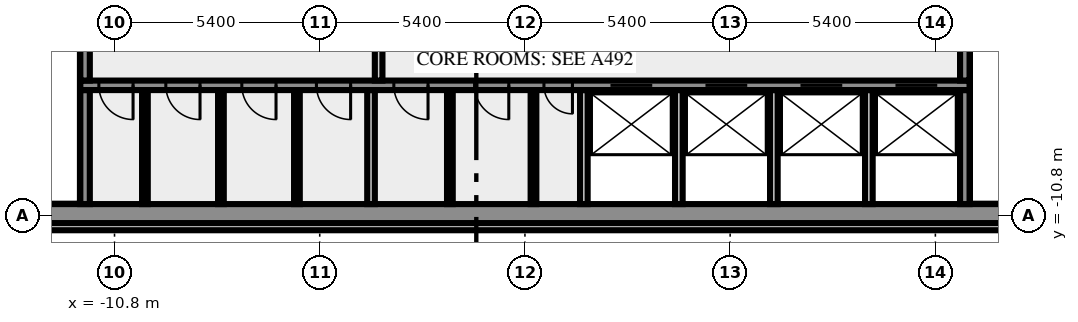
"""IFC4 building model, lengths in metres.
Left out: names, types, materials, properties, quantities, classifications, styles, units other than length and angle.
Written with IfcOpenShell. Run it as: python <this file> out.ifc"""

import sys

from ifc_helpers import new_model, si_unit, direction, frame, frame_2d, origin, place, context, subcontext, project, spatial, rectangle, extrude, element, fill, save


model = new_model("IFC4")
c1 = context("Model", 3, precision=1e-05, world=origin(), true_north=direction((0.0, 1.0)))
c2 = subcontext(c1, "Body", "Model", "MODEL_VIEW")
j1 = project(units=[si_unit("LENGTHUNIT", "METRE"), si_unit("PLANEANGLEUNIT", "RADIAN")], contexts=[c1])
p1 = place(None, origin())
s1 = spatial("IfcSite", under=j1, at=p1, CompositionType="ELEMENT")
p2 = place(p1, origin())
s2 = spatial("IfcBuilding", under=s1, at=p2, CompositionType="ELEMENT")
p3 = place(p2, frame((0.0, 0.0, 202.0)))
s3 = spatial("IfcBuildingStorey", under=s2, at=p3, CompositionType="ELEMENT", Elevation=202.0)
p4 = place(p3, frame((-17.444, -11.088, 0.0), z_axis=(0.0, 0.0, 1.0), x_axis=(1.0, 0.0, 0.0)))
e1 = element("IfcWall", 1, at=p4, inside=s3, PredefinedType="SOLIDWALL", context=c2, shape_type="SweptSolid", body=[
    extrude(rectangle(XDim=34.888, YDim=0.2, at=frame_2d((17.444, 0.0))), origin(), (0.0, 0.0, 1.0), 3.65),
])
p5 = place(p3, frame((-20.0, -10.75, 0.0), z_axis=(0.0, 0.0, 1.0), x_axis=(1.0, 0.0, 0.0)))
e2 = element("IfcWall", 2, at=p5, inside=s3, PredefinedType="SHEAR", context=c2, shape_type="SweptSolid", body=[
    extrude(rectangle(XDim=40.0, YDim=0.5, at=frame_2d((20.0, 0.0))), origin(), (0.0, 0.0, 1.0), 3.65),
])
p6 = place(p5, frame((0.8, 0.0, 1.0)))
e3 = element("IfcOpeningElement", 3, at=p6, cuts=e2, PredefinedType="OPENING", context=c2, shape_type="SweptSolid", body=[
    extrude(rectangle(XDim=1.2, YDim=1.2, at=frame_2d((0.6, 0.6))), frame((0.0, 0.26, 0.0), z_axis=(0.0, -1.0, 0.0), x_axis=(1.0, 0.0, 0.0)), (0.0, 0.0, 1.0), 0.52),
])
p7 = place(p5, frame((38.0, 0.0, 1.0)))
e4 = element("IfcOpeningElement", 4, at=p7, cuts=e2, PredefinedType="OPENING", context=c2, shape_type="SweptSolid", body=[
    extrude(rectangle(XDim=1.2, YDim=1.2, at=frame_2d((0.6, 0.6))), frame((0.0, 0.26, 0.0), z_axis=(0.0, -1.0, 0.0), x_axis=(1.0, 0.0, 0.0)), (0.0, 0.0, 1.0), 0.52),
])
p8 = place(p3, frame((-11.575, -10.5, 0.0), z_axis=(0.0, 0.0, 1.0), x_axis=(0.0, 1.0, 0.0)))
e5 = element("IfcWall", 5, at=p8, inside=s3, PredefinedType="SHEAR", context=c2, shape_type="SweptSolid", body=[
    extrude(rectangle(XDim=3.0, YDim=0.25, at=frame_2d((1.5, 0.0))), origin(), (0.0, 0.0, 1.0), 3.65),
])
for number, where, z_axis, x_axis in (
    (6, (-10.0, -10.5, 0.0), (0.0, 0.0, 1.0), (0.0, 1.0, 0.0)),
    (7, (-8.0, -10.5, 0.0), (0.0, 0.0, 1.0), (0.0, 1.0, 0.0)),
    (8, (-6.0, -10.5, 0.0), (0.0, 0.0, 1.0), (0.0, 1.0, 0.0)),
):
    element("IfcWall", number, at=place(p3, frame(where, z_axis=z_axis, x_axis=x_axis)), inside=s3, PredefinedType="PARTITIONING", context=c2, shape_type="SweptSolid", body=[
        extrude(rectangle(XDim=3.0, YDim=0.15, at=frame_2d((1.5, 0.0))), origin(), (0.0, 0.0, 1.0), 3.65),
    ])
p9 = place(p3, frame((-4.05, -10.5, 0.0), z_axis=(0.0, 0.0, 1.0), x_axis=(0.0, 1.0, 0.0)))
e9 = element("IfcWall", 9, at=p9, inside=s3, PredefinedType="SOLIDWALL", context=c2, shape_type="SweptSolid", body=[
    extrude(rectangle(XDim=3.0, YDim=0.2, at=frame_2d((1.5, 0.0))), origin(), (0.0, 0.0, 1.0), 3.65),
])
for number, where, z_axis, x_axis in (
    (10, (-1.975, -10.5, 0.0), (0.0, 0.0, 1.0), (0.0, 1.0, 0.0)),
    (11, (0.225, -10.5, 0.0), (0.0, 0.0, 1.0), (0.0, 1.0, 0.0)),
):
    element("IfcWall", number, at=place(p3, frame(where, z_axis=z_axis, x_axis=x_axis)), inside=s3, PredefinedType="PARTITIONING", context=c2, shape_type="SweptSolid", body=[
        extrude(rectangle(XDim=3.0, YDim=0.15, at=frame_2d((1.5, 0.0))), origin(), (0.0, 0.0, 1.0), 3.65),
    ])
for number, where, z_axis, x_axis in (
    (12, (1.55, -10.5, 0.0), (0.0, 0.0, 1.0), (0.0, 1.0, 0.0)),
    (13, (4.05, -10.5, 0.0), (0.0, 0.0, 1.0), (0.0, 1.0, 0.0)),
    (14, (6.55, -10.5, 0.0), (0.0, 0.0, 1.0), (0.0, 1.0, 0.0)),
    (15, (9.05, -10.5, 0.0), (0.0, 0.0, 1.0), (0.0, 1.0, 0.0)),
):
    element("IfcWall", number, at=place(p3, frame(where, z_axis=z_axis, x_axis=x_axis)), inside=s3, PredefinedType="SOLIDWALL", context=c2, shape_type="SweptSolid", body=[
        extrude(rectangle(XDim=3.0, YDim=0.2, at=frame_2d((1.5, 0.0))), origin(), (0.0, 0.0, 1.0), 3.65),
    ])
p10 = place(p3, frame((11.575, -10.5, 0.0), z_axis=(0.0, 0.0, 1.0), x_axis=(0.0, 1.0, 0.0)))
e16 = element("IfcWall", 16, at=p10, inside=s3, PredefinedType="SHEAR", context=c2, shape_type="SweptSolid", body=[
    extrude(rectangle(XDim=3.0, YDim=0.25, at=frame_2d((1.5, 0.0))), origin(), (0.0, 0.0, 1.0), 3.65),
])
p11 = place(p3, frame((11.7, -7.375, 0.0), z_axis=(0.0, 0.0, 1.0), x_axis=(-1.0, 0.0, 0.0)))
e17 = element("IfcWall", 17, at=p11, inside=s3, PredefinedType="SHEAR", context=c2, shape_type="SweptSolid", body=[
    extrude(rectangle(XDim=23.4, YDim=0.25, at=frame_2d((11.7, 0.0))), origin(), (0.0, 0.0, 1.0), 3.65),
])
p12 = place(p11, frame((22.012, 0.0, 0.0)))
e18 = element("IfcOpeningElement", 18, at=p12, cuts=e17, PredefinedType="OPENING", context=c2, shape_type="SweptSolid", body=[
    extrude(rectangle(XDim=0.9, YDim=2.1, at=frame_2d((0.45, 1.05))), frame((0.0, 0.135, 0.0), z_axis=(0.0, -1.0, 0.0), x_axis=(1.0, 0.0, 0.0)), (0.0, 0.0, 1.0), 0.27),
])
p13 = place(p11, frame((20.25, 0.0, 0.0)))
e19 = element("IfcOpeningElement", 19, at=p13, cuts=e17, PredefinedType="OPENING", context=c2, shape_type="SweptSolid", body=[
    extrude(rectangle(XDim=0.9, YDim=2.1, at=frame_2d((0.45, 1.05))), frame((0.0, 0.135, 0.0), z_axis=(0.0, -1.0, 0.0), x_axis=(1.0, 0.0, 0.0)), (0.0, 0.0, 1.0), 0.27),
])
p14 = place(p11, frame((18.25, 0.0, 0.0)))
e20 = element("IfcOpeningElement", 20, at=p14, cuts=e17, PredefinedType="OPENING", context=c2, shape_type="SweptSolid", body=[
    extrude(rectangle(XDim=0.9, YDim=2.1, at=frame_2d((0.45, 1.05))), frame((0.0, 0.135, 0.0), z_axis=(0.0, -1.0, 0.0), x_axis=(1.0, 0.0, 0.0)), (0.0, 0.0, 1.0), 0.27),
])
p15 = place(p11, frame((16.287, 0.0, 0.0)))
e21 = element("IfcOpeningElement", 21, at=p15, cuts=e17, PredefinedType="OPENING", context=c2, shape_type="SweptSolid", body=[
    extrude(rectangle(XDim=0.9, YDim=2.1, at=frame_2d((0.45, 1.05))), frame((0.0, 0.135, 0.0), z_axis=(0.0, -1.0, 0.0), x_axis=(1.0, 0.0, 0.0)), (0.0, 0.0, 1.0), 0.27),
])
p16 = place(p11, frame((14.25, 0.0, 0.0)))
e22 = element("IfcOpeningElement", 22, at=p16, cuts=e17, PredefinedType="OPENING", context=c2, shape_type="SweptSolid", body=[
    extrude(rectangle(XDim=0.9, YDim=2.1, at=frame_2d((0.45, 1.05))), frame((0.0, 0.135, 0.0), z_axis=(0.0, -1.0, 0.0), x_axis=(1.0, 0.0, 0.0)), (0.0, 0.0, 1.0), 0.27),
])
p17 = place(p11, frame((12.125, 0.0, 0.0)))
e23 = element("IfcOpeningElement", 23, at=p17, cuts=e17, PredefinedType="OPENING", context=c2, shape_type="SweptSolid", body=[
    extrude(rectangle(XDim=0.9, YDim=2.1, at=frame_2d((0.45, 1.05))), frame((0.0, 0.135, 0.0), z_axis=(0.0, -1.0, 0.0), x_axis=(1.0, 0.0, 0.0)), (0.0, 0.0, 1.0), 0.27),
])
p18 = place(p11, frame((10.45, 0.0, 0.0)))
e24 = element("IfcOpeningElement", 24, at=p18, cuts=e17, PredefinedType="OPENING", context=c2, shape_type="SweptSolid", body=[
    extrude(rectangle(XDim=0.75, YDim=2.1, at=frame_2d((0.375, 1.05))), frame((0.0, 0.135, 0.0), z_axis=(0.0, -1.0, 0.0), x_axis=(1.0, 0.0, 0.0)), (0.0, 0.0, 1.0), 0.27),
])
p19 = place(p11, frame((8.35, 0.0, 0.0)))
e25 = element("IfcOpeningElement", 25, at=p19, cuts=e17, PredefinedType="OPENING", context=c2, shape_type="SweptSolid", body=[
    extrude(rectangle(XDim=1.1, YDim=2.1, at=frame_2d((0.55, 1.05))), frame((0.0, 0.135, 0.0), z_axis=(0.0, -1.0, 0.0), x_axis=(1.0, 0.0, 0.0)), (0.0, 0.0, 1.0), 0.27),
])
p20 = place(p11, frame((5.85, 0.0, 0.0)))
e26 = element("IfcOpeningElement", 26, at=p20, cuts=e17, PredefinedType="OPENING", context=c2, shape_type="SweptSolid", body=[
    extrude(rectangle(XDim=1.1, YDim=2.1, at=frame_2d((0.55, 1.05))), frame((0.0, 0.135, 0.0), z_axis=(0.0, -1.0, 0.0), x_axis=(1.0, 0.0, 0.0)), (0.0, 0.0, 1.0), 0.27),
])
p21 = place(p11, frame((3.35, 0.0, 0.0)))
e27 = element("IfcOpeningElement", 27, at=p21, cuts=e17, PredefinedType="OPENING", context=c2, shape_type="SweptSolid", body=[
    extrude(rectangle(XDim=1.1, YDim=2.1, at=frame_2d((0.55, 1.05))), frame((0.0, 0.135, 0.0), z_axis=(0.0, -1.0, 0.0), x_axis=(1.0, 0.0, 0.0)), (0.0, 0.0, 1.0), 0.27),
])
p22 = place(p11, frame((0.85, 0.0, 0.0)))
e28 = element("IfcOpeningElement", 28, at=p22, cuts=e17, PredefinedType="OPENING", context=c2, shape_type="SweptSolid", body=[
    extrude(rectangle(XDim=1.1, YDim=2.1, at=frame_2d((0.55, 1.05))), frame((0.0, 0.135, 0.0), z_axis=(0.0, -1.0, 0.0), x_axis=(1.0, 0.0, 0.0)), (0.0, 0.0, 1.0), 0.27),
])
p23 = place(p3, frame((-11.575, -7.25, 0.0), z_axis=(0.0, 0.0, 1.0), x_axis=(0.0, 1.0, 0.0)))
e29 = element("IfcWall", 29, at=p23, inside=s3, PredefinedType="SHEAR", context=c2, shape_type="SweptSolid", body=[
    extrude(rectangle(XDim=1.0, YDim=0.25, at=frame_2d((0.5, 0.0))), origin(), (0.0, 0.0, 1.0), 3.65),
])
p24 = place(p3, frame((-3.85, -4.25, 0.0), z_axis=(0.0, 0.0, 1.0), x_axis=(0.0, -1.0, 0.0)))
e30 = element("IfcWall", 30, at=p24, inside=s3, PredefinedType="SOLIDWALL", context=c2, shape_type="SweptSolid", body=[
    extrude(rectangle(XDim=3.0, YDim=0.2, at=frame_2d((1.5, 0.0))), origin(), (0.0, 0.0, 1.0), 3.65),
])
p25 = place(p24, frame((0.8, 0.0, 0.0)))
e31 = element("IfcOpeningElement", 31, at=p25, cuts=e30, PredefinedType="OPENING", context=c2, shape_type="SweptSolid", body=[
    extrude(rectangle(XDim=1.4, YDim=2.1, at=frame_2d((0.7, 1.05))), frame((0.0, 0.11, 0.0), z_axis=(0.0, -1.0, 0.0), x_axis=(1.0, 0.0, 0.0)), (0.0, 0.0, 1.0), 0.22),
])
p26 = place(p3, frame((11.575, -7.25, 0.0), z_axis=(0.0, 0.0, 1.0), x_axis=(0.0, 1.0, 0.0)))
e32 = element("IfcWall", 32, at=p26, inside=s3, PredefinedType="SHEAR", context=c2, shape_type="SweptSolid", body=[
    extrude(rectangle(XDim=1.0, YDim=0.25, at=frame_2d((0.5, 0.0))), origin(), (0.0, 0.0, 1.0), 3.65),
])
p27 = place(p12, origin())
e33 = element("IfcDoor", 33, at=p27, inside=s3, OperationType="SINGLE_SWING_RIGHT", PredefinedType="DOOR", context=c2, shape_type="SweptSolid", body=[
    extrude(rectangle(XDim=0.9, YDim=2.1, at=frame_2d((0.45, 1.05))), frame((0.0, 0.025, 0.0), z_axis=(0.0, -1.0, 0.0), x_axis=(1.0, 0.0, 0.0)), (0.0, 0.0, 1.0), 0.05),
])
fill(e18, e33)
p28 = place(p13, origin())
e34 = element("IfcDoor", 34, at=p28, inside=s3, OperationType="SINGLE_SWING_RIGHT", PredefinedType="DOOR", context=c2, shape_type="SweptSolid", body=[
    extrude(rectangle(XDim=0.9, YDim=2.1, at=frame_2d((0.45, 1.05))), frame((0.0, 0.025, 0.0), z_axis=(0.0, -1.0, 0.0), x_axis=(1.0, 0.0, 0.0)), (0.0, 0.0, 1.0), 0.05),
])
fill(e19, e34)
p29 = place(p14, origin())
e35 = element("IfcDoor", 35, at=p29, inside=s3, OperationType="SINGLE_SWING_RIGHT", PredefinedType="DOOR", context=c2, shape_type="SweptSolid", body=[
    extrude(rectangle(XDim=0.9, YDim=2.1, at=frame_2d((0.45, 1.05))), frame((0.0, 0.025, 0.0), z_axis=(0.0, -1.0, 0.0), x_axis=(1.0, 0.0, 0.0)), (0.0, 0.0, 1.0), 0.05),
])
fill(e20, e35)
p30 = place(p15, origin())
e36 = element("IfcDoor", 36, at=p30, inside=s3, OperationType="SINGLE_SWING_RIGHT", PredefinedType="DOOR", context=c2, shape_type="SweptSolid", body=[
    extrude(rectangle(XDim=0.9, YDim=2.1, at=frame_2d((0.45, 1.05))), frame((0.0, 0.025, 0.0), z_axis=(0.0, -1.0, 0.0), x_axis=(1.0, 0.0, 0.0)), (0.0, 0.0, 1.0), 0.05),
])
fill(e21, e36)
p31 = place(p16, origin())
e37 = element("IfcDoor", 37, at=p31, inside=s3, OperationType="SINGLE_SWING_RIGHT", PredefinedType="DOOR", context=c2, shape_type="SweptSolid", body=[
    extrude(rectangle(XDim=0.9, YDim=2.1, at=frame_2d((0.45, 1.05))), frame((0.0, 0.025, 0.0), z_axis=(0.0, -1.0, 0.0), x_axis=(1.0, 0.0, 0.0)), (0.0, 0.0, 1.0), 0.05),
])
fill(e22, e37)
p32 = place(p17, origin())
e38 = element("IfcDoor", 38, at=p32, inside=s3, OperationType="SINGLE_SWING_RIGHT", PredefinedType="DOOR", context=c2, shape_type="SweptSolid", body=[
    extrude(rectangle(XDim=0.9, YDim=2.1, at=frame_2d((0.45, 1.05))), frame((0.0, 0.025, 0.0), z_axis=(0.0, -1.0, 0.0), x_axis=(1.0, 0.0, 0.0)), (0.0, 0.0, 1.0), 0.05),
])
fill(e23, e38)
p33 = place(p18, origin())
e39 = element("IfcDoor", 39, at=p33, inside=s3, OperationType="SINGLE_SWING_LEFT", PredefinedType="DOOR", context=c2, shape_type="SweptSolid", body=[
    extrude(rectangle(XDim=0.75, YDim=2.1, at=frame_2d((0.375, 1.05))), frame((0.0, 0.025, 0.0), z_axis=(0.0, -1.0, 0.0), x_axis=(1.0, 0.0, 0.0)), (0.0, 0.0, 1.0), 0.05),
])
fill(e24, e39)
p34 = place(p19, origin())
e40 = element("IfcDoor", 40, at=p34, inside=s3, OperationType="DOUBLE_DOOR_SLIDING", PredefinedType="DOOR", context=c2, shape_type="SweptSolid", body=[
    extrude(rectangle(XDim=1.1, YDim=2.1, at=frame_2d((0.55, 1.05))), frame((0.0, 0.025, 0.0), z_axis=(0.0, -1.0, 0.0), x_axis=(1.0, 0.0, 0.0)), (0.0, 0.0, 1.0), 0.05),
])
fill(e25, e40)
p35 = place(p20, origin())
e41 = element("IfcDoor", 41, at=p35, inside=s3, OperationType="DOUBLE_DOOR_SLIDING", PredefinedType="DOOR", context=c2, shape_type="SweptSolid", body=[
    extrude(rectangle(XDim=1.1, YDim=2.1, at=frame_2d((0.55, 1.05))), frame((0.0, 0.025, 0.0), z_axis=(0.0, -1.0, 0.0), x_axis=(1.0, 0.0, 0.0)), (0.0, 0.0, 1.0), 0.05),
])
fill(e26, e41)
p36 = place(p21, origin())
e42 = element("IfcDoor", 42, at=p36, inside=s3, OperationType="DOUBLE_DOOR_SLIDING", PredefinedType="DOOR", context=c2, shape_type="SweptSolid", body=[
    extrude(rectangle(XDim=1.1, YDim=2.1, at=frame_2d((0.55, 1.05))), frame((0.0, 0.025, 0.0), z_axis=(0.0, -1.0, 0.0), x_axis=(1.0, 0.0, 0.0)), (0.0, 0.0, 1.0), 0.05),
])
fill(e27, e42)
p37 = place(p22, origin())
e43 = element("IfcDoor", 43, at=p37, inside=s3, OperationType="DOUBLE_DOOR_SLIDING", PredefinedType="DOOR", context=c2, shape_type="SweptSolid", body=[
    extrude(rectangle(XDim=1.1, YDim=2.1, at=frame_2d((0.55, 1.05))), frame((0.0, 0.025, 0.0), z_axis=(0.0, -1.0, 0.0), x_axis=(1.0, 0.0, 0.0)), (0.0, 0.0, 1.0), 0.05),
])
fill(e28, e43)
save(model, sys.argv[1])
